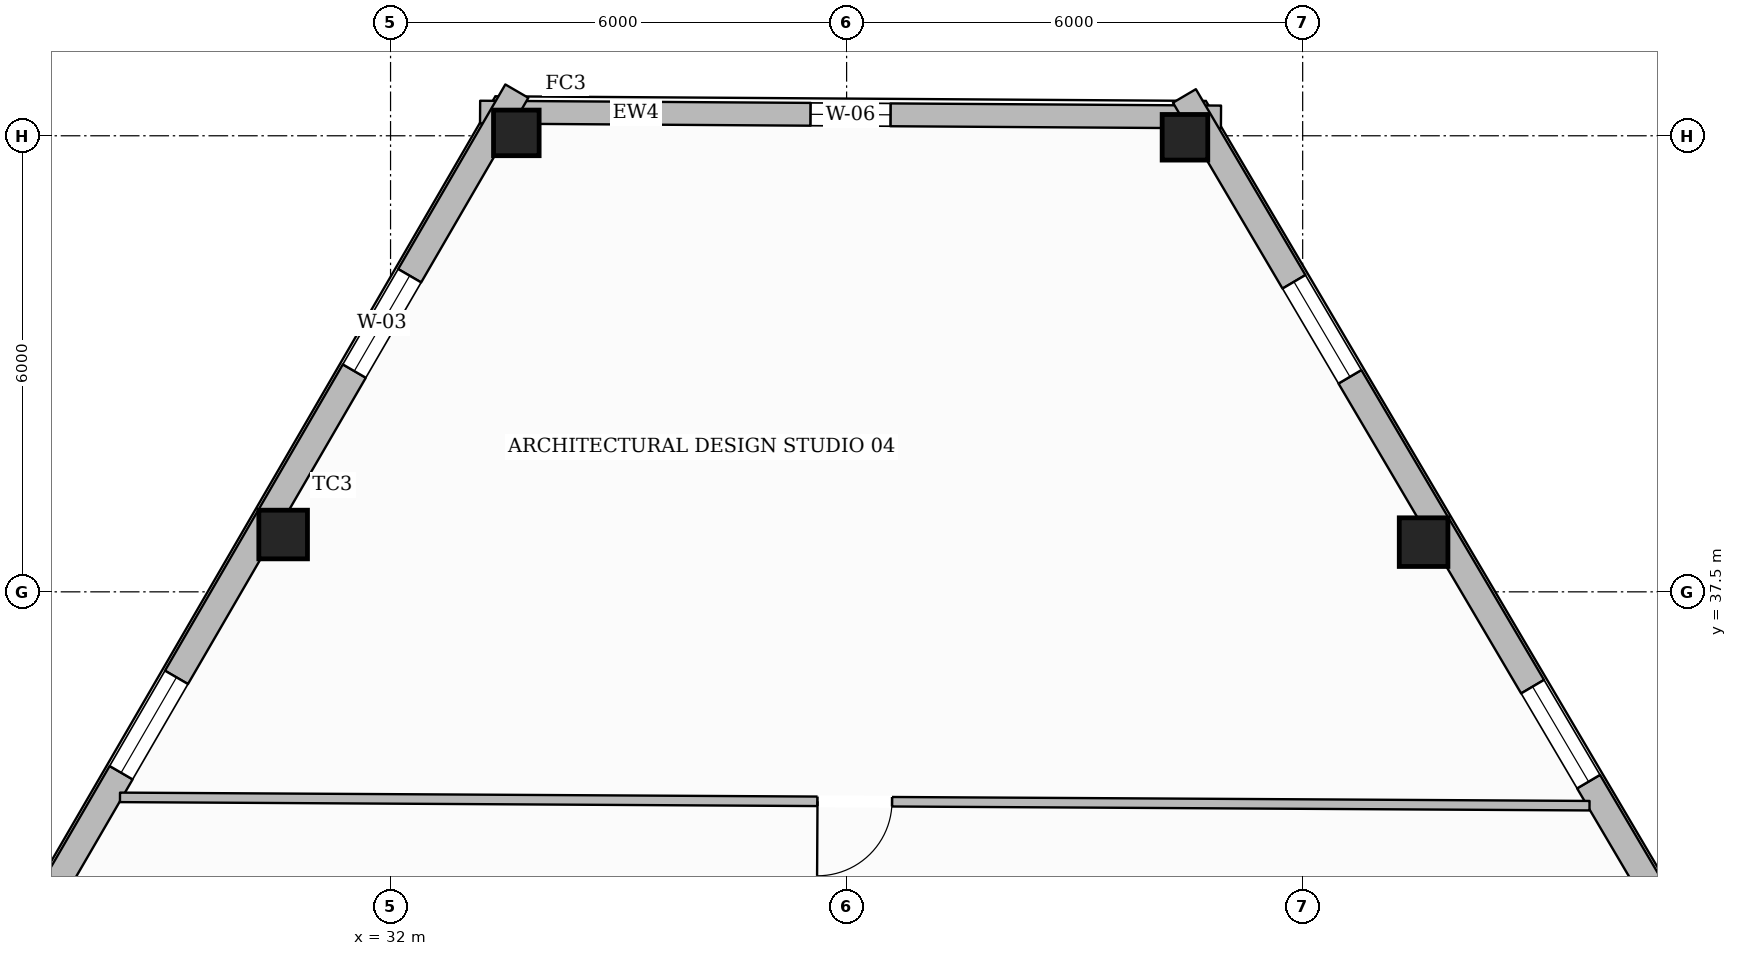
"""IFC4 building model, lengths in metres.
Left out: names, types, materials, properties, quantities, classifications, styles, units other than length and angle.
Written with IfcOpenShell. Run it as: python <this file> out.ifc"""

import sys

from ifc_helpers import new_model, si_unit, direction, frame, frame_2d, origin, origin_2d, place, context, subcontext, project, spatial, rectangle, hollow_rectangle, extrude, element, fill, save


model = new_model("IFC4")
c1 = context("Model", 3, precision=1e-05, world=origin(), true_north=direction((0.0, 1.0)))
c2 = subcontext(c1, "Body", "Model", "MODEL_VIEW")
j1 = project(units=[si_unit("LENGTHUNIT", "METRE"), si_unit("PLANEANGLEUNIT", "RADIAN")], contexts=[c1])
p1 = place(None, origin())
s1 = spatial("IfcSite", under=j1, at=p1, CompositionType="ELEMENT")
p2 = place(p1, origin())
s2 = spatial("IfcBuilding", under=s1, at=p2, CompositionType="ELEMENT")
p3 = place(p2, frame((0.0, 0.0, 195.8)))
s3 = spatial("IfcBuildingStorey", under=s2, at=p3, CompositionType="ELEMENT", Elevation=195.8)
p4 = place(p3, frame((33.655, 43.538, 0.0), z_axis=(0.0, 0.0, 1.0), x_axis=(1.0, 0.0, 0.0)))
e1 = element("IfcColumn", 1, at=p4, inside=s3, PredefinedType="COLUMN", context=c2, shape_type="SweptSolid", body=[
    extrude(hollow_rectangle(XDim=0.6, YDim=0.6, WallThickness=0.028, at=origin_2d()), origin(), (0.0, 0.0, 1.0), 3.6),
])
for number, where, z_axis, x_axis in (
    (2, (30.587, 38.254, 0.0), (0.0, 0.0, 1.0), (1.0, 0.0, 0.0)),
    (3, (45.591, 38.154, 0.0), (0.0, 0.0, 1.0), (1.0, 0.0, 0.0)),
):
    element("IfcColumn", number, at=place(p3, frame(where, z_axis=z_axis, x_axis=x_axis)), inside=s3, PredefinedType="COLUMN", context=c2, shape_type="SweptSolid", body=[
        extrude(hollow_rectangle(XDim=0.64, YDim=0.64, WallThickness=0.028, at=origin_2d()), origin(), (0.0, 0.0, 1.0), 3.6),
    ])
p5 = place(p3, frame((42.451, 43.48, 0.0), z_axis=(0.0, 0.0, 1.0), x_axis=(1.0, 0.0, 0.0)))
e4 = element("IfcColumn", 4, at=p5, inside=s3, PredefinedType="COLUMN", context=c2, shape_type="SweptSolid", body=[
    extrude(hollow_rectangle(XDim=0.6, YDim=0.6, WallThickness=0.028, at=origin_2d()), origin(), (0.0, 0.0, 1.0), 3.6),
])
p6 = place(p3, frame((33.178, 43.811, 0.0), z_axis=(0.0, 0.0, 1.0), x_axis=(0.999978468776, -0.006562163026, 0.0)))
e5 = element("IfcWall", 5, at=p6, inside=s3, PredefinedType="STANDARD", context=c2, shape_type="SweptSolid", body=[
    extrude(rectangle(XDim=9.748, YDim=0.3, at=frame_2d((4.874, 0.0))), origin(), (0.0, 0.0, 1.0), 3.132),
])
p7 = place(p6, frame((4.349, 0.0, 0.65)))
e6 = element("IfcOpeningElement", 6, at=p7, cuts=e5, PredefinedType="OPENING", context=c2, shape_type="SweptSolid", body=[
    extrude(rectangle(XDim=1.05, YDim=1.7, at=frame_2d((0.525, 0.85))), frame((0.0, 0.16, 0.0), z_axis=(0.0, -1.0, 0.0), x_axis=(1.0, 0.0, 0.0)), (0.0, 0.0, 1.0), 0.32),
])
p8 = place(p3, frame((14.773, 11.555, 0.0), z_axis=(0.0, 0.0, 1.0), x_axis=(0.502113441051, 0.864801764751, 0.0)))
e7 = element("IfcWall", 7, at=p8, inside=s3, PredefinedType="STANDARD", context=c2, shape_type="SweptSolid", body=[
    extrude(rectangle(XDim=37.618, YDim=0.35, at=frame_2d((18.809, 0.0))), origin(), (0.0, 0.0, 1.0), 3.132),
])
p9 = place(p8, frame((33.36, 0.0, 0.65)))
e8 = element("IfcOpeningElement", 8, at=p9, cuts=e7, PredefinedType="OPENING", context=c2, shape_type="SweptSolid", body=[
    extrude(rectangle(XDim=1.45, YDim=1.75, at=frame_2d((0.725, 0.875))), frame((0.0, 0.185, 0.0), z_axis=(0.0, -1.0, 0.0), x_axis=(1.0, 0.0, 0.0)), (0.0, 0.0, 1.0), 0.37),
])
p10 = place(p8, frame((27.25, 0.0, 0.65)))
e9 = element("IfcOpeningElement", 9, at=p10, cuts=e7, PredefinedType="OPENING", context=c2, shape_type="SweptSolid", body=[
    extrude(rectangle(XDim=1.45, YDim=1.75, at=frame_2d((0.725, 0.875))), frame((0.0, 0.185, 0.0), z_axis=(0.0, -1.0, 0.0), x_axis=(1.0, 0.0, 0.0)), (0.0, 0.0, 1.0), 0.37),
])
p11 = place(p8, frame((15.03, 0.0, 0.65)))
e10 = element("IfcOpeningElement", 10, at=p11, cuts=e7, PredefinedType="OPENING", context=c2, shape_type="SweptSolid", body=[
    extrude(rectangle(XDim=1.45, YDim=1.75, at=frame_2d((0.725, 0.875))), frame((0.0, 0.185, 0.0), z_axis=(0.0, -1.0, 0.0), x_axis=(1.0, 0.0, 0.0)), (0.0, 0.0, 1.0), 0.37),
])
p12 = place(p8, frame((8.92, 0.0, 0.65)))
e11 = element("IfcOpeningElement", 11, at=p12, cuts=e7, PredefinedType="OPENING", context=c2, shape_type="SweptSolid", body=[
    extrude(rectangle(XDim=1.45, YDim=1.75, at=frame_2d((0.725, 0.875))), frame((0.0, 0.185, 0.0), z_axis=(0.0, -1.0, 0.0), x_axis=(1.0, 0.0, 0.0)), (0.0, 0.0, 1.0), 0.37),
])
p13 = place(p8, frame((2.811, 0.0, 0.65)))
e12 = element("IfcOpeningElement", 12, at=p13, cuts=e7, PredefinedType="OPENING", context=c2, shape_type="SweptSolid", body=[
    extrude(rectangle(XDim=1.45, YDim=1.75, at=frame_2d((0.725, 0.875))), frame((0.0, 0.185, 0.0), z_axis=(0.0, -1.0, 0.0), x_axis=(1.0, 0.0, 0.0)), (0.0, 0.0, 1.0), 0.37),
])
p14 = place(p3, frame((42.444, 44.024, 0.0), z_axis=(0.0, 0.0, 1.0), x_axis=(0.507770038723, -0.861492651028, 0.0)))
e13 = element("IfcWall", 13, at=p14, inside=s3, PredefinedType="STANDARD", context=c2, shape_type="SweptSolid", body=[
    extrude(rectangle(XDim=38.049, YDim=0.35, at=frame_2d((19.024, 0.0))), origin(), (0.0, 0.0, 1.0), 3.132),
])
p15 = place(p14, frame((33.752, 0.0, 0.65)))
e14 = element("IfcOpeningElement", 14, at=p15, cuts=e13, PredefinedType="OPENING", context=c2, shape_type="SweptSolid", body=[
    extrude(rectangle(XDim=1.45, YDim=1.75, at=frame_2d((0.725, 0.875))), frame((0.0, 0.185, 0.0), z_axis=(0.0, -1.0, 0.0), x_axis=(1.0, 0.0, 0.0)), (0.0, 0.0, 1.0), 0.37),
])
p16 = place(p14, frame((27.569, 0.0, 0.65)))
e15 = element("IfcOpeningElement", 15, at=p16, cuts=e13, PredefinedType="OPENING", context=c2, shape_type="SweptSolid", body=[
    extrude(rectangle(XDim=1.45, YDim=1.75, at=frame_2d((0.725, 0.875))), frame((0.0, 0.185, 0.0), z_axis=(0.0, -1.0, 0.0), x_axis=(1.0, 0.0, 0.0)), (0.0, 0.0, 1.0), 0.37),
])
p17 = place(p14, frame((15.204, 0.0, 0.65)))
e16 = element("IfcOpeningElement", 16, at=p17, cuts=e13, PredefinedType="OPENING", context=c2, shape_type="SweptSolid", body=[
    extrude(rectangle(XDim=1.45, YDim=1.75, at=frame_2d((0.725, 0.875))), frame((0.0, 0.185, 0.0), z_axis=(0.0, -1.0, 0.0), x_axis=(1.0, 0.0, 0.0)), (0.0, 0.0, 1.0), 0.37),
])
p18 = place(p14, frame((9.021, 0.0, 0.65)))
e17 = element("IfcOpeningElement", 17, at=p18, cuts=e13, PredefinedType="OPENING", context=c2, shape_type="SweptSolid", body=[
    extrude(rectangle(XDim=1.45, YDim=1.75, at=frame_2d((0.725, 0.875))), frame((0.0, 0.185, 0.0), z_axis=(0.0, -1.0, 0.0), x_axis=(1.0, 0.0, 0.0)), (0.0, 0.0, 1.0), 0.37),
])
p19 = place(p14, frame((2.839, 0.0, 0.65)))
e18 = element("IfcOpeningElement", 18, at=p19, cuts=e13, PredefinedType="OPENING", context=c2, shape_type="SweptSolid", body=[
    extrude(rectangle(XDim=1.45, YDim=1.75, at=frame_2d((0.725, 0.875))), frame((0.0, 0.185, 0.0), z_axis=(0.0, -1.0, 0.0), x_axis=(1.0, 0.0, 0.0)), (0.0, 0.0, 1.0), 0.37),
])
p20 = place(p3, frame((47.774, 34.687, 0.0), z_axis=(0.0, 0.0, 1.0), x_axis=(-0.999983926054, 0.005669888277, 0.0)))
e19 = element("IfcWall", 19, at=p20, inside=s3, PredefinedType="PARTITIONING", context=c2, shape_type="SweptSolid", body=[
    extrude(rectangle(XDim=19.333, YDim=0.125, at=frame_2d((9.667, 0.0))), origin(), (0.0, 0.0, 1.0), 3.6),
])
p21 = place(p20, frame((9.177, 0.0, 0.0)))
e20 = element("IfcOpeningElement", 20, at=p21, cuts=e19, PredefinedType="OPENING", context=c2, shape_type="SweptSolid", body=[
    extrude(rectangle(XDim=0.98, YDim=2.15, at=frame_2d((0.49, 1.075))), frame((0.0, 0.073, 0.0), z_axis=(0.0, -1.0, 0.0), x_axis=(1.0, 0.0, 0.0)), (0.0, 0.0, 1.0), 0.145),
])
p22 = place(p9, origin())
e21 = element("IfcWindow", 21, at=p22, inside=s3, PartitioningType="SINGLE_PANEL", PredefinedType="WINDOW", context=c2, shape_type="SweptSolid", body=[
    extrude(rectangle(XDim=1.45, YDim=1.75, at=frame_2d((0.725, 0.875))), frame((0.0, 0.03, 0.0), z_axis=(0.0, -1.0, 0.0), x_axis=(1.0, 0.0, 0.0)), (0.0, 0.0, 1.0), 0.06),
])
fill(e8, e21)
p23 = place(p10, origin())
e22 = element("IfcWindow", 22, at=p23, inside=s3, PartitioningType="SINGLE_PANEL", PredefinedType="WINDOW", context=c2, shape_type="SweptSolid", body=[
    extrude(rectangle(XDim=1.45, YDim=1.75, at=frame_2d((0.725, 0.875))), frame((0.0, 0.03, 0.0), z_axis=(0.0, -1.0, 0.0), x_axis=(1.0, 0.0, 0.0)), (0.0, 0.0, 1.0), 0.06),
])
fill(e9, e22)
p24 = place(p18, origin())
e23 = element("IfcWindow", 23, at=p24, inside=s3, PartitioningType="SINGLE_PANEL", PredefinedType="WINDOW", context=c2, shape_type="SweptSolid", body=[
    extrude(rectangle(XDim=1.45, YDim=1.75, at=frame_2d((0.725, 0.875))), frame((0.0, 0.03, 0.0), z_axis=(0.0, -1.0, 0.0), x_axis=(1.0, 0.0, 0.0)), (0.0, 0.0, 1.0), 0.06),
])
fill(e17, e23)
p25 = place(p19, origin())
e24 = element("IfcWindow", 24, at=p25, inside=s3, PartitioningType="SINGLE_PANEL", PredefinedType="WINDOW", context=c2, shape_type="SweptSolid", body=[
    extrude(rectangle(XDim=1.45, YDim=1.75, at=frame_2d((0.725, 0.875))), frame((0.0, 0.03, 0.0), z_axis=(0.0, -1.0, 0.0), x_axis=(1.0, 0.0, 0.0)), (0.0, 0.0, 1.0), 0.06),
])
fill(e18, e24)
p26 = place(p7, origin())
e25 = element("IfcWindow", 25, at=p26, inside=s3, PartitioningType="SINGLE_PANEL", PredefinedType="WINDOW", context=c2, shape_type="SweptSolid", body=[
    extrude(rectangle(XDim=1.05, YDim=1.7, at=frame_2d((0.525, 0.85))), frame((0.0, 0.03, 0.0), z_axis=(0.0, -1.0, 0.0), x_axis=(1.0, 0.0, 0.0)), (0.0, 0.0, 1.0), 0.06),
])
fill(e6, e25)
p27 = place(p21, origin())
e26 = element("IfcDoor", 26, at=p27, inside=s3, OperationType="SINGLE_SWING_RIGHT", PredefinedType="DOOR", context=c2, shape_type="SweptSolid", body=[
    extrude(rectangle(XDim=0.98, YDim=2.15, at=frame_2d((0.49, 1.075))), frame((0.0, 0.025, 0.0), z_axis=(0.0, -1.0, 0.0), x_axis=(1.0, 0.0, 0.0)), (0.0, 0.0, 1.0), 0.05),
])
fill(e20, e26)
save(model, sys.argv[1])
